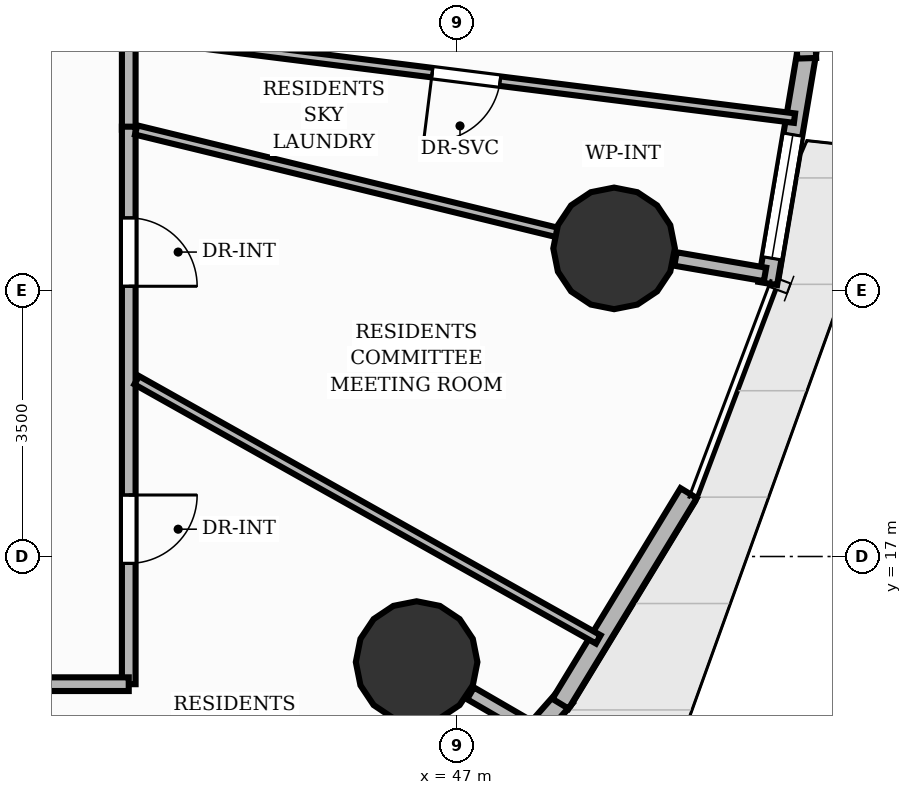
"""IFC4 building model, lengths in metres.
Left out: names, types, materials, properties, quantities, classifications, styles, units other than length and angle.
Written with IfcOpenShell. Run it as: python <this file> out.ifc"""

import sys

from ifc_helpers import new_model, si_unit, direction, frame, frame_2d, origin, origin_2d, place, context, subcontext, project, spatial, rectangle, circle, extrude, element, fill, save


model = new_model("IFC4")
c1 = context("Model", 3, precision=1e-05, world=origin(), true_north=direction((0.0, 1.0)))
c2 = subcontext(c1, "Body", "Model", "MODEL_VIEW")
j1 = project(units=[si_unit("LENGTHUNIT", "METRE"), si_unit("PLANEANGLEUNIT", "RADIAN")], contexts=[c1])
p1 = place(None, origin())
s1 = spatial("IfcSite", under=j1, at=p1, CompositionType="ELEMENT")
p2 = place(p1, origin())
s2 = spatial("IfcBuilding", under=s1, at=p2, CompositionType="ELEMENT")
p3 = place(p2, frame((0.0, 0.0, 34.4)))
s3 = spatial("IfcBuildingStorey", under=s2, at=p3, CompositionType="ELEMENT", Elevation=34.4)
for number, where, z_axis, x_axis in (
    (1, (46.468, 15.611, 0.0), (0.0, 0.0, 1.0), (1.0, 0.0, 0.0)),
    (2, (49.066, 21.054, 0.0), (0.0, 0.0, 1.0), (1.0, 0.0, 0.0)),
):
    element("IfcColumn", number, at=place(p3, frame(where, z_axis=z_axis, x_axis=x_axis)), inside=s3, PredefinedType="COLUMN", context=c2, shape_type="SweptSolid", body=[
        extrude(circle(Radius=0.8, at=origin_2d()), origin(), (0.0, 0.0, 1.0), 3.2),
    ])
p4 = place(p3, frame((48.427, 15.152, 0.0), z_axis=(0.0, 0.0, 1.0), x_axis=(-0.662112398544, -0.749404544751, 0.0)))
e3 = element("IfcWall", 3, at=p4, inside=s3, PredefinedType="SOLIDWALL", context=c2, shape_type="SweptSolid", body=[
    extrude(rectangle(XDim=3.323, YDim=0.25, at=frame_2d((1.661, 0.0))), origin(), (0.0, 0.0, 1.0), 2.96),
])
p5 = place(p4, frame((0.961, 0.0, 0.85)))
e4 = element("IfcOpeningElement", 4, at=p5, cuts=e3, PredefinedType="OPENING", context=c2, shape_type="SweptSolid", body=[
    extrude(rectangle(XDim=1.4, YDim=1.55, at=frame_2d((0.7, 0.775))), frame((0.0, 0.135, 0.0), z_axis=(0.0, -1.0, 0.0), x_axis=(1.0, 0.0, 0.0)), (0.0, 0.0, 1.0), 0.27),
])
p6 = place(p3, frame((50.046, 17.834, 0.0), z_axis=(0.0, 0.0, 1.0), x_axis=(-0.519753566346, -0.854316235519, 0.0)))
e5 = element("IfcWall", 5, at=p6, inside=s3, PredefinedType="SOLIDWALL", context=c2, shape_type="SweptSolid", body=[
    extrude(rectangle(XDim=3.244, YDim=0.25, at=frame_2d((1.622, 0.0))), origin(), (0.0, 0.0, 1.0), 2.96),
])
p7 = place(p3, frame((51.607, 23.67, 0.0), z_axis=(0.0, 0.0, 1.0), x_axis=(-0.166403122634, -0.98605780803, 0.0)))
e6 = element("IfcWall", 6, at=p7, inside=s3, PredefinedType="SOLIDWALL", context=c2, shape_type="SweptSolid", body=[
    extrude(rectangle(XDim=3.121, YDim=0.25, at=frame_2d((1.56, 0.0))), origin(), (0.0, 0.0, 1.0), 2.96),
])
p8 = place(p7, frame((1.135, 0.0, 0.85)))
e7 = element("IfcOpeningElement", 7, at=p8, cuts=e6, PredefinedType="OPENING", context=c2, shape_type="SweptSolid", body=[
    extrude(rectangle(XDim=1.65, YDim=1.29, at=frame_2d((0.825, 0.645))), frame((0.0, 0.135, 0.0), z_axis=(0.0, -1.0, 0.0), x_axis=(1.0, 0.0, 0.0)), (0.0, 0.0, 1.0), 0.27),
])
p9 = place(p3, frame((51.501, 26.646, 0.0), z_axis=(0.0, 0.0, 1.0), x_axis=(0.031584802517, -0.999501075662, 0.0)))
e8 = element("IfcWall", 8, at=p9, inside=s3, PredefinedType="SOLIDWALL", context=c2, shape_type="SweptSolid", body=[
    extrude(rectangle(XDim=3.092, YDim=0.25, at=frame_2d((1.546, 0.0))), origin(), (0.0, 0.0, 1.0), 2.96),
])
p10 = place(p9, frame((0.721, 0.0, 0.85)))
e9 = element("IfcOpeningElement", 9, at=p10, cuts=e8, PredefinedType="OPENING", context=c2, shape_type="SweptSolid", body=[
    extrude(rectangle(XDim=1.65, YDim=1.55, at=frame_2d((0.825, 0.775))), frame((0.0, 0.135, 0.0), z_axis=(0.0, -1.0, 0.0), x_axis=(1.0, 0.0, 0.0)), (0.0, 0.0, 1.0), 0.27),
])
p11 = place(p3, frame((47.177, 15.2, 0.0), z_axis=(0.0, 0.0, 1.0), x_axis=(0.864965183009, -0.501831876411, 0.0)))
e10 = element("IfcWall", 10, at=p11, inside=s3, PredefinedType="PARTITIONING", context=c2, shape_type="SweptSolid", body=[
    extrude(rectangle(XDim=0.931, YDim=0.18, at=frame_2d((0.466, 0.0))), origin(), (0.0, 0.0, 1.0), 2.178),
])
p12 = place(p3, frame((49.874, 20.915, 0.0), z_axis=(0.0, 0.0, 1.0), x_axis=(0.98541644509, -0.170160012181, 0.0)))
e11 = element("IfcWall", 11, at=p12, inside=s3, PredefinedType="PARTITIONING", context=c2, shape_type="SweptSolid", body=[
    extrude(rectangle(XDim=1.195, YDim=0.18, at=frame_2d((0.598, 0.0))), origin(), (0.0, 0.0, 1.0), 2.178),
])
p13 = place(p3, frame((42.68, 32.68, 0.0), z_axis=(0.0, 0.0, 1.0), x_axis=(0.0, -1.0, 0.0)))
e12 = element("IfcWall", 12, at=p13, inside=s3, PredefinedType="PARTITIONING", context=c2, shape_type="SweptSolid", body=[
    extrude(rectangle(XDim=10.065, YDim=0.18, at=frame_2d((5.032, 0.0))), origin(), (0.0, 0.0, 1.0), 2.955),
])
p14 = place(p13, frame((7.374, 0.0, 0.0)))
e13 = element("IfcOpeningElement", 13, at=p14, cuts=e12, PredefinedType="OPENING", context=c2, shape_type="SweptSolid", body=[
    extrude(rectangle(XDim=0.9, YDim=2.1, at=frame_2d((0.45, 1.05))), frame((0.0, 0.1, 0.0), z_axis=(0.0, -1.0, 0.0), x_axis=(1.0, 0.0, 0.0)), (0.0, 0.0, 1.0), 0.2),
])
p15 = place(p3, frame((42.68, 22.656, 0.0), z_axis=(0.0, 0.0, 1.0), x_axis=(0.0, -1.0, 0.0)))
e14 = element("IfcWall", 14, at=p15, inside=s3, PredefinedType="PARTITIONING", context=c2, shape_type="SweptSolid", body=[
    extrude(rectangle(XDim=7.335, YDim=0.18, at=frame_2d((3.668, 0.0))), origin(), (0.0, 0.0, 1.0), 2.955),
])
p16 = place(p15, frame((1.2, 0.0, 0.0)))
e15 = element("IfcOpeningElement", 15, at=p16, cuts=e14, PredefinedType="OPENING", context=c2, shape_type="SweptSolid", body=[
    extrude(rectangle(XDim=0.9, YDim=2.1, at=frame_2d((0.45, 1.05))), frame((0.0, 0.1, 0.0), z_axis=(0.0, -1.0, 0.0), x_axis=(1.0, 0.0, 0.0)), (0.0, 0.0, 1.0), 0.2),
])
p17 = place(p15, frame((4.846, 0.0, 0.0)))
e16 = element("IfcOpeningElement", 16, at=p17, cuts=e14, PredefinedType="OPENING", context=c2, shape_type="SweptSolid", body=[
    extrude(rectangle(XDim=0.9, YDim=2.1, at=frame_2d((0.45, 1.05))), frame((0.0, 0.1, 0.0), z_axis=(0.0, -1.0, 0.0), x_axis=(1.0, 0.0, 0.0)), (0.0, 0.0, 1.0), 0.2),
])
p18 = place(p3, frame((42.68, 15.32, 0.0), z_axis=(0.0, 0.0, 1.0), x_axis=(-1.0, 0.0, 0.0)))
e17 = element("IfcWall", 17, at=p18, inside=s3, PredefinedType="PARTITIONING", context=c2, shape_type="SweptSolid", body=[
    extrude(rectangle(XDim=21.36, YDim=0.18, at=frame_2d((10.68, 0.0))), origin(), (0.0, 0.0, 1.0), 2.955),
])
p19 = place(p18, frame((3.036, 0.0, 0.0)))
e18 = element("IfcOpeningElement", 18, at=p19, cuts=e17, PredefinedType="OPENING", context=c2, shape_type="SweptSolid", body=[
    extrude(rectangle(XDim=0.9, YDim=2.1, at=frame_2d((0.45, 1.05))), frame((0.0, 0.1, 0.0), z_axis=(0.0, -1.0, 0.0), x_axis=(1.0, 0.0, 0.0)), (0.0, 0.0, 1.0), 0.2),
])
p20 = place(p18, frame((6.275, 0.0, 0.0)))
e19 = element("IfcOpeningElement", 19, at=p20, cuts=e17, PredefinedType="OPENING", context=c2, shape_type="SweptSolid", body=[
    extrude(rectangle(XDim=0.9, YDim=2.1, at=frame_2d((0.45, 1.05))), frame((0.0, 0.1, 0.0), z_axis=(0.0, -1.0, 0.0), x_axis=(1.0, 0.0, 0.0)), (0.0, 0.0, 1.0), 0.2),
])
p21 = place(p18, frame((14.49, 0.0, 0.0)))
e20 = element("IfcOpeningElement", 20, at=p21, cuts=e17, PredefinedType="OPENING", context=c2, shape_type="SweptSolid", body=[
    extrude(rectangle(XDim=1.05, YDim=2.15, at=frame_2d((0.525, 1.075))), frame((0.0, 0.1, 0.0), z_axis=(0.0, -1.0, 0.0), x_axis=(1.0, 0.0, 0.0)), (0.0, 0.0, 1.0), 0.2),
])
p22 = place(p3, frame((51.439, 22.768, 0.0), z_axis=(0.0, 0.0, 1.0), x_axis=(-0.992204813033, 0.124617851825, 0.0)))
e21 = element("IfcWall", 21, at=p22, inside=s3, PredefinedType="PARTITIONING", context=c2, shape_type="SweptSolid", body=[
    extrude(rectangle(XDim=8.708, YDim=0.125, at=frame_2d((4.354, 0.0))), origin(), (0.0, 0.0, 1.0), 2.642),
])
p23 = place(p22, frame((3.904, 0.0, 0.0)))
e22 = element("IfcOpeningElement", 22, at=p23, cuts=e21, PredefinedType="OPENING", context=c2, shape_type="SweptSolid", body=[
    extrude(rectangle(XDim=0.9, YDim=2.1, at=frame_2d((0.45, 1.05))), frame((0.0, 0.073, 0.0), z_axis=(0.0, -1.0, 0.0), x_axis=(1.0, 0.0, 0.0)), (0.0, 0.0, 1.0), 0.145),
])
p24 = place(p3, frame((48.858, 15.909, 0.0), z_axis=(0.0, 0.0, 1.0), x_axis=(-0.871931019114, 0.489628734764, 0.0)))
e23 = element("IfcWall", 23, at=p24, inside=s3, PredefinedType="PARTITIONING", context=c2, shape_type="SweptSolid", body=[
    extrude(rectangle(XDim=6.965, YDim=0.125, at=frame_2d((3.483, 0.0))), origin(), (0.0, 0.0, 1.0), 2.642),
])
p25 = place(p3, frame((42.777, 22.612, 0.0), z_axis=(0.0, 0.0, 1.0), x_axis=(0.971633604644, -0.236491307083, 0.0)))
e24 = element("IfcWall", 24, at=p25, inside=s3, PredefinedType="PARTITIONING", context=c2, shape_type="SweptSolid", body=[
    extrude(rectangle(XDim=5.707, YDim=0.125, at=frame_2d((2.854, 0.0))), origin(), (0.0, 0.0, 1.0), 2.178),
])
p26 = place(p3, frame((43.998, 10.897, 0.0), z_axis=(0.0, 0.0, 1.0), x_axis=(-0.623937025269, 0.781474624347, 0.0)))
e25 = element("IfcWall", 25, at=p26, inside=s3, PredefinedType="PARTITIONING", context=c2, shape_type="SweptSolid", body=[
    extrude(rectangle(XDim=5.54, YDim=0.125, at=frame_2d((2.77, 0.0))), origin(), (0.0, 0.0, 1.0), 2.955),
])
p27 = place(p8, origin())
e26 = element("IfcWindow", 26, at=p27, inside=s3, PartitioningType="SINGLE_PANEL", PredefinedType="WINDOW", context=c2, shape_type="SweptSolid", body=[
    extrude(rectangle(XDim=1.65, YDim=1.29, at=frame_2d((0.825, 0.645))), frame((0.0, 0.03, 0.0), z_axis=(0.0, -1.0, 0.0), x_axis=(1.0, 0.0, 0.0)), (0.0, 0.0, 1.0), 0.06),
])
fill(e7, e26)
p28 = place(p16, origin())
e27 = element("IfcDoor", 27, at=p28, inside=s3, OperationType="SINGLE_SWING_RIGHT", PredefinedType="DOOR", context=c2, shape_type="SweptSolid", body=[
    extrude(rectangle(XDim=0.9, YDim=2.1, at=frame_2d((0.45, 1.05))), frame((0.0, 0.025, 0.0), z_axis=(0.0, -1.0, 0.0), x_axis=(1.0, 0.0, 0.0)), (0.0, 0.0, 1.0), 0.05),
])
fill(e15, e27)
p29 = place(p17, origin())
e28 = element("IfcDoor", 28, at=p29, inside=s3, OperationType="SINGLE_SWING_LEFT", PredefinedType="DOOR", context=c2, shape_type="SweptSolid", body=[
    extrude(rectangle(XDim=0.9, YDim=2.1, at=frame_2d((0.45, 1.05))), frame((0.0, 0.025, 0.0), z_axis=(0.0, -1.0, 0.0), x_axis=(1.0, 0.0, 0.0)), (0.0, 0.0, 1.0), 0.05),
])
fill(e16, e28)
p30 = place(p23, origin())
e29 = element("IfcDoor", 29, at=p30, inside=s3, OperationType="SINGLE_SWING_RIGHT", PredefinedType="DOOR", context=c2, shape_type="SweptSolid", body=[
    extrude(rectangle(XDim=0.9, YDim=2.1, at=frame_2d((0.45, 1.05))), frame((0.0, 0.025, 0.0), z_axis=(0.0, -1.0, 0.0), x_axis=(1.0, 0.0, 0.0)), (0.0, 0.0, 1.0), 0.05),
])
fill(e22, e29)
save(model, sys.argv[1])
